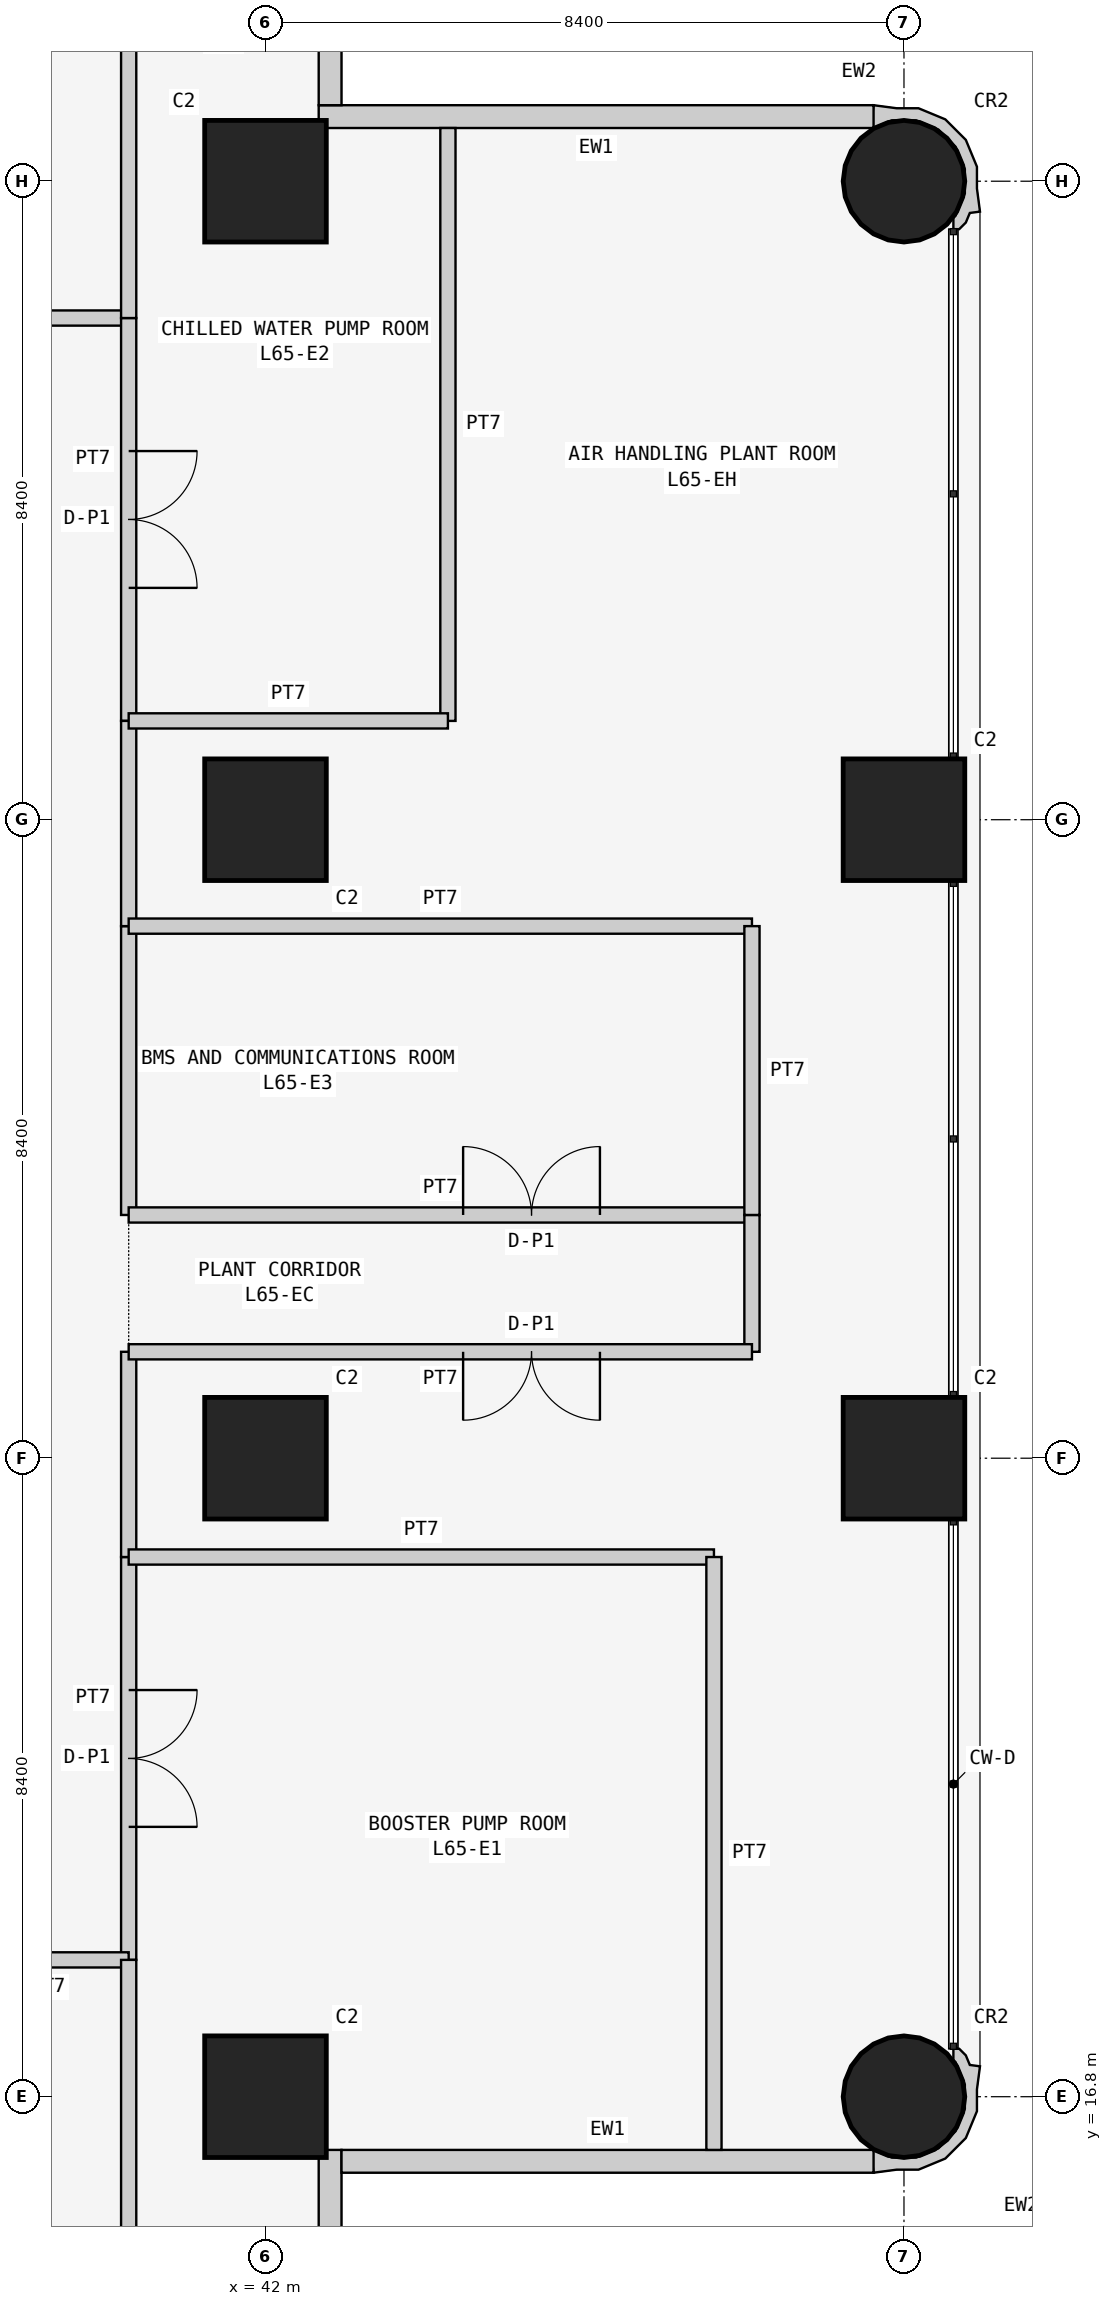
"""IFC4 building model, lengths in metres.
Left out: names, types, materials, properties, quantities, classifications, styles, units other than length and angle.
Written with IfcOpenShell. Run it as: python <this file> out.ifc"""

import sys

from ifc_helpers import new_model, si_unit, direction, frame, frame_2d, origin, origin_2d, place, context, subcontext, project, spatial, polyline, rectangle, circle, outline, extrude, element, fill, save


model = new_model("IFC4")
c1 = context("Model", 3, precision=1e-05, world=origin(), true_north=direction((0.0, 1.0)))
c2 = subcontext(c1, "Body", "Model", "MODEL_VIEW")
j1 = project(units=[si_unit("LENGTHUNIT", "METRE"), si_unit("PLANEANGLEUNIT", "RADIAN")], contexts=[c1])
p1 = place(None, origin())
s1 = spatial("IfcSite", under=j1, at=p1, CompositionType="ELEMENT")
p2 = place(p1, origin())
s2 = spatial("IfcBuilding", under=s1, at=p2, CompositionType="ELEMENT")
p3 = place(p2, frame((0.0, 0.0, 248.1)))
s3 = spatial("IfcBuildingStorey", under=s2, at=p3, CompositionType="ELEMENT", Elevation=248.1)
for number, where, z_axis, x_axis in (
    (1, (42.0, 16.8, 0.0), (0.0, 0.0, 1.0), (1.0, 0.0, 0.0)),
    (2, (42.0, 25.2, 0.0), (0.0, 0.0, 1.0), (1.0, 0.0, 0.0)),
    (3, (42.0, 33.6, 0.0), (0.0, 0.0, 1.0), (1.0, 0.0, 0.0)),
    (4, (42.0, 42.0, 0.0), (0.0, 0.0, 1.0), (1.0, 0.0, 0.0)),
):
    element("IfcColumn", number, at=place(p3, frame(where, z_axis=z_axis, x_axis=x_axis)), inside=s3, PredefinedType="COLUMN", context=c2, shape_type="SweptSolid", body=[
        extrude(rectangle(XDim=1.6, YDim=1.6, at=origin_2d()), origin(), (0.0, 0.0, 1.0), 6.0),
    ])
p4 = place(p3, frame((50.4, 16.8, 0.0), z_axis=(0.0, 0.0, 1.0), x_axis=(1.0, 0.0, 0.0)))
e5 = element("IfcColumn", 5, at=p4, inside=s3, PredefinedType="COLUMN", context=c2, shape_type="SweptSolid", body=[
    extrude(circle(Radius=0.8, at=origin_2d()), origin(), (0.0, 0.0, 1.0), 6.0),
])
for number, where, z_axis, x_axis in (
    (6, (50.4, 25.2, 0.0), (0.0, 0.0, 1.0), (1.0, 0.0, 0.0)),
    (7, (50.4, 33.6, 0.0), (0.0, 0.0, 1.0), (1.0, 0.0, 0.0)),
):
    element("IfcColumn", number, at=place(p3, frame(where, z_axis=z_axis, x_axis=x_axis)), inside=s3, PredefinedType="COLUMN", context=c2, shape_type="SweptSolid", body=[
        extrude(rectangle(XDim=1.6, YDim=1.6, at=origin_2d()), origin(), (0.0, 0.0, 1.0), 6.0),
    ])
p5 = place(p3, frame((50.4, 42.0, 0.0), z_axis=(0.0, 0.0, 1.0), x_axis=(1.0, 0.0, 0.0)))
e8 = element("IfcColumn", 8, at=p5, inside=s3, PredefinedType="COLUMN", context=c2, shape_type="SweptSolid", body=[
    extrude(circle(Radius=0.8, at=origin_2d()), origin(), (0.0, 0.0, 1.0), 6.0),
])
p6 = place(p3, frame((42.85, 8.8, 0.0), z_axis=(0.0, 0.0, 1.0), x_axis=(0.0, 1.0, 0.0)))
e9 = element("IfcWall", 9, at=p6, inside=s3, PredefinedType="SOLIDWALL", context=c2, shape_type="SweptSolid", body=[
    extrude(rectangle(XDim=7.3, YDim=0.3, at=frame_2d((3.65, 0.0))), origin(), (0.0, 0.0, 1.0), 5.85),
])
p7 = place(p3, frame((43.0, 15.95, 0.0), z_axis=(0.0, 0.0, 1.0), x_axis=(1.0, 0.0, 0.0)))
e10 = element("IfcWall", 10, at=p7, inside=s3, PredefinedType="SOLIDWALL", context=c2, shape_type="SweptSolid", body=[
    extrude(rectangle(XDim=7.0, YDim=0.3, at=frame_2d((3.5, 0.0))), origin(), (0.0, 0.0, 1.0), 5.85),
])
p8 = place(p3, frame((50.0, 42.85, 0.0), z_axis=(0.0, 0.0, 1.0), x_axis=(-1.0, 0.0, 0.0)))
e11 = element("IfcWall", 11, at=p8, inside=s3, PredefinedType="SOLIDWALL", context=c2, shape_type="SweptSolid", body=[
    extrude(rectangle(XDim=7.3, YDim=0.3, at=frame_2d((3.65, 0.0))), origin(), (0.0, 0.0, 1.0), 5.85),
])
p9 = place(p3, frame((42.85, 43.0, 0.0), z_axis=(0.0, 0.0, 1.0), x_axis=(0.0, 1.0, 0.0)))
e12 = element("IfcWall", 12, at=p9, inside=s3, PredefinedType="SOLIDWALL", context=c2, shape_type="SweptSolid", body=[
    extrude(rectangle(XDim=7.0, YDim=0.3, at=frame_2d((3.5, 0.0))), origin(), (0.0, 0.0, 1.0), 5.85),
])
p10 = place(p3, frame((50.073, 15.983, 0.0), z_axis=(0.0, 0.0, 1.0), x_axis=(0.936905536785, -0.34958262992, 0.0)))
e13 = element("IfcWall", 13, at=p10, inside=s3, PredefinedType="SOLIDWALL", context=c2, shape_type="SweptSolid", body=[
    extrude(outline(polyline([(0.818, 1.604), (0.686, 1.574), (0.593, 1.674), (0.481, 1.725), (0.409, 1.698), (0.461, 1.559), (0.498, 1.542), (0.715, 1.309), (0.827, 1.01), (0.815, 0.692), (0.683, 0.402), (0.45, 0.185), (0.151, 0.074), (-0.117, 0.083), (-0.128, 0.077), (-0.147, 0.07), (-0.005, -0.197), (0.266, -0.053), (0.535, 0.047), (0.815, 0.307), (0.973, 0.655), (0.987, 1.036), (0.886, 1.306), (0.818, 1.604)])), origin(), (0.0, 0.0, 1.0), 5.85),
])
p11 = place(p3, frame((51.065, 41.423, 0.0), z_axis=(0.0, 0.0, 1.0), x_axis=(0.936905536785, 0.34958262992, 0.0)))
e14 = element("IfcWall", 14, at=p11, inside=s3, PredefinedType="SOLIDWALL", context=c2, shape_type="SweptSolid", body=[
    extrude(outline(polyline([(0.445, 0.347), (0.545, 0.616), (0.532, 0.998), (0.373, 1.345), (0.094, 1.605), (-0.176, 1.706), (-0.446, 1.849), (-0.588, 1.582), (-0.57, 1.575), (-0.558, 1.569), (-0.29, 1.579), (0.008, 1.468), (0.242, 1.25), (0.374, 0.96), (0.385, 0.642), (0.274, 0.344), (0.057, 0.11), (0.019, 0.093), (-0.033, -0.046), (0.039, -0.072), (0.151, -0.021), (0.245, 0.079), (0.376, 0.049), (0.445, 0.347)])), origin(), (0.0, 0.0, 1.0), 5.85),
])
p12 = place(p3, frame((34.9, 40.2, 0.0), z_axis=(0.0, 0.0, 1.0), x_axis=(1.0, 0.0, 0.0)))
e15 = element("IfcWall", 15, at=p12, inside=s3, PredefinedType="PARTITIONING", context=c2, shape_type="SweptSolid", body=[
    extrude(rectangle(XDim=5.3, YDim=0.2, at=frame_2d((2.65, 0.0))), origin(), (0.0, 0.0, 1.0), 5.85),
])
p13 = place(p12, frame((1.75, 0.0, 0.0)))
e16 = element("IfcOpeningElement", 16, at=p13, cuts=e15, PredefinedType="OPENING", context=c2, shape_type="SweptSolid", body=[
    extrude(rectangle(XDim=1.8, YDim=2.4, at=frame_2d((0.9, 1.2))), frame((0.0, 0.11, 0.0), z_axis=(0.0, -1.0, 0.0), x_axis=(1.0, 0.0, 0.0)), (0.0, 0.0, 1.0), 0.22),
])
p14 = place(p3, frame((40.2, 23.9, 0.0), z_axis=(0.0, 0.0, 1.0), x_axis=(0.0, -1.0, 0.0)))
e17 = element("IfcWall", 17, at=p14, inside=s3, PredefinedType="PARTITIONING", context=c2, shape_type="SweptSolid", body=[
    extrude(rectangle(XDim=5.3, YDim=0.2, at=frame_2d((2.65, 0.0))), origin(), (0.0, 0.0, 1.0), 5.85),
])
p15 = place(p14, frame((1.75, 0.0, 0.0)))
e18 = element("IfcOpeningElement", 18, at=p15, cuts=e17, PredefinedType="OPENING", context=c2, shape_type="SweptSolid", body=[
    extrude(rectangle(XDim=1.8, YDim=2.4, at=frame_2d((0.9, 1.2))), frame((0.0, 0.11, 0.0), z_axis=(0.0, -1.0, 0.0), x_axis=(1.0, 0.0, 0.0)), (0.0, 0.0, 1.0), 0.22),
])
p16 = place(p3, frame((40.2, 40.2, 0.0), z_axis=(0.0, 0.0, 1.0), x_axis=(0.0, -1.0, 0.0)))
e19 = element("IfcWall", 19, at=p16, inside=s3, PredefinedType="PARTITIONING", context=c2, shape_type="SweptSolid", body=[
    extrude(rectangle(XDim=5.3, YDim=0.2, at=frame_2d((2.65, 0.0))), origin(), (0.0, 0.0, 1.0), 5.85),
])
p17 = place(p16, frame((1.75, 0.0, 0.0)))
e20 = element("IfcOpeningElement", 20, at=p17, cuts=e19, PredefinedType="OPENING", context=c2, shape_type="SweptSolid", body=[
    extrude(rectangle(XDim=1.8, YDim=2.4, at=frame_2d((0.9, 1.2))), frame((0.0, 0.11, 0.0), z_axis=(0.0, -1.0, 0.0), x_axis=(1.0, 0.0, 0.0)), (0.0, 0.0, 1.0), 0.22),
])
p18 = place(p3, frame((40.2, 32.2, 0.0), z_axis=(0.0, 0.0, 1.0), x_axis=(0.0, -1.0, 0.0)))
e21 = element("IfcWall", 21, at=p18, inside=s3, PredefinedType="PARTITIONING", context=c2, shape_type="SweptSolid", body=[
    extrude(rectangle(XDim=3.8, YDim=0.2, at=frame_2d((1.9, 0.0))), origin(), (0.0, 0.0, 1.0), 5.85),
])
p19 = place(p3, frame((40.2, 26.6, 0.0), z_axis=(0.0, 0.0, 1.0), x_axis=(0.0, -1.0, 0.0)))
e22 = element("IfcWall", 22, at=p19, inside=s3, PredefinedType="PARTITIONING", context=c2, shape_type="SweptSolid", body=[
    extrude(rectangle(XDim=2.7, YDim=0.2, at=frame_2d((1.35, 0.0))), origin(), (0.0, 0.0, 1.0), 5.85),
])
p20 = place(p3, frame((40.2, 34.9, 0.0), z_axis=(0.0, 0.0, 1.0), x_axis=(0.0, -1.0, 0.0)))
e23 = element("IfcWall", 23, at=p20, inside=s3, PredefinedType="PARTITIONING", context=c2, shape_type="SweptSolid", body=[
    extrude(rectangle(XDim=2.7, YDim=0.2, at=frame_2d((1.35, 0.0))), origin(), (0.0, 0.0, 1.0), 5.85),
])
p21 = place(p3, frame((40.2, 18.6, 0.0), z_axis=(0.0, 0.0, 1.0), x_axis=(-1.0, 0.0, 0.0)))
e24 = element("IfcWall", 24, at=p21, inside=s3, PredefinedType="PARTITIONING", context=c2, shape_type="SweptSolid", body=[
    extrude(rectangle(XDim=5.3, YDim=0.2, at=frame_2d((2.65, 0.0))), origin(), (0.0, 0.0, 1.0), 5.85),
])
p22 = place(p21, frame((1.75, 0.0, 0.0)))
e25 = element("IfcOpeningElement", 25, at=p22, cuts=e24, PredefinedType="OPENING", context=c2, shape_type="SweptSolid", body=[
    extrude(rectangle(XDim=1.8, YDim=2.4, at=frame_2d((0.9, 1.2))), frame((0.0, 0.11, 0.0), z_axis=(0.0, -1.0, 0.0), x_axis=(1.0, 0.0, 0.0)), (0.0, 0.0, 1.0), 0.22),
])
p23 = place(p3, frame((40.2, 44.2, 0.0), z_axis=(0.0, 0.0, 1.0), x_axis=(0.0, -1.0, 0.0)))
e26 = element("IfcWall", 26, at=p23, inside=s3, PredefinedType="PARTITIONING", context=c2, shape_type="SweptSolid", body=[
    extrude(rectangle(XDim=4.0, YDim=0.2, at=frame_2d((2.0, 0.0))), origin(), (0.0, 0.0, 1.0), 5.85),
])
p24 = place(p3, frame((40.2, 23.9, 0.0), z_axis=(0.0, 0.0, 1.0), x_axis=(1.0, 0.0, 0.0)))
e27 = element("IfcWall", 27, at=p24, inside=s3, PredefinedType="PARTITIONING", context=c2, shape_type="SweptSolid", body=[
    extrude(rectangle(XDim=7.7, YDim=0.2, at=frame_2d((3.85, 0.0))), origin(), (0.0, 0.0, 1.0), 5.85),
])
p25 = place(p3, frame((47.9, 23.9, 0.0), z_axis=(0.0, 0.0, 1.0), x_axis=(0.0, -1.0, 0.0)))
e28 = element("IfcWall", 28, at=p25, inside=s3, PredefinedType="PARTITIONING", context=c2, shape_type="SweptSolid", body=[
    extrude(rectangle(XDim=7.8, YDim=0.2, at=frame_2d((3.9, 0.0))), origin(), (0.0, 0.0, 1.0), 5.85),
])
p26 = place(p3, frame((40.2, 14.6, 0.0), z_axis=(0.0, 0.0, 1.0), x_axis=(0.0, 1.0, 0.0)))
e29 = element("IfcWall", 29, at=p26, inside=s3, PredefinedType="PARTITIONING", context=c2, shape_type="SweptSolid", body=[
    extrude(rectangle(XDim=4.0, YDim=0.2, at=frame_2d((2.0, 0.0))), origin(), (0.0, 0.0, 1.0), 5.85),
])
p27 = place(p3, frame((44.4, 42.7, 0.0), z_axis=(0.0, 0.0, 1.0), x_axis=(0.0, -1.0, 0.0)))
e30 = element("IfcWall", 30, at=p27, inside=s3, PredefinedType="PARTITIONING", context=c2, shape_type="SweptSolid", body=[
    extrude(rectangle(XDim=7.8, YDim=0.2, at=frame_2d((3.9, 0.0))), origin(), (0.0, 0.0, 1.0), 5.85),
])
p28 = place(p3, frame((44.4, 34.9, 0.0), z_axis=(0.0, 0.0, 1.0), x_axis=(-1.0, 0.0, 0.0)))
e31 = element("IfcWall", 31, at=p28, inside=s3, PredefinedType="PARTITIONING", context=c2, shape_type="SweptSolid", body=[
    extrude(rectangle(XDim=4.2, YDim=0.2, at=frame_2d((2.1, 0.0))), origin(), (0.0, 0.0, 1.0), 5.85),
])
p29 = place(p3, frame((40.2, 28.4, 0.0), z_axis=(0.0, 0.0, 1.0), x_axis=(1.0, 0.0, 0.0)))
e32 = element("IfcWall", 32, at=p29, inside=s3, PredefinedType="PARTITIONING", context=c2, shape_type="SweptSolid", body=[
    extrude(rectangle(XDim=8.2, YDim=0.2, at=frame_2d((4.1, 0.0))), origin(), (0.0, 0.0, 1.0), 5.85),
])
p30 = place(p29, frame((4.4, 0.0, 0.0)))
e33 = element("IfcOpeningElement", 33, at=p30, cuts=e32, PredefinedType="OPENING", context=c2, shape_type="SweptSolid", body=[
    extrude(rectangle(XDim=1.8, YDim=2.4, at=frame_2d((0.9, 1.2))), frame((0.0, 0.11, 0.0), z_axis=(0.0, -1.0, 0.0), x_axis=(1.0, 0.0, 0.0)), (0.0, 0.0, 1.0), 0.22),
])
p31 = place(p3, frame((48.4, 28.4, 0.0), z_axis=(0.0, 0.0, 1.0), x_axis=(0.0, -1.0, 0.0)))
e34 = element("IfcWall", 34, at=p31, inside=s3, PredefinedType="PARTITIONING", context=c2, shape_type="SweptSolid", body=[
    extrude(rectangle(XDim=1.8, YDim=0.2, at=frame_2d((0.9, 0.0))), origin(), (0.0, 0.0, 1.0), 5.85),
])
p32 = place(p3, frame((48.4, 26.6, 0.0), z_axis=(0.0, 0.0, 1.0), x_axis=(-1.0, 0.0, 0.0)))
e35 = element("IfcWall", 35, at=p32, inside=s3, PredefinedType="PARTITIONING", context=c2, shape_type="SweptSolid", body=[
    extrude(rectangle(XDim=8.2, YDim=0.2, at=frame_2d((4.1, 0.0))), origin(), (0.0, 0.0, 1.0), 5.85),
])
p33 = place(p32, frame((2.0, 0.0, 0.0)))
e36 = element("IfcOpeningElement", 36, at=p33, cuts=e35, PredefinedType="OPENING", context=c2, shape_type="SweptSolid", body=[
    extrude(rectangle(XDim=1.8, YDim=2.4, at=frame_2d((0.9, 1.2))), frame((0.0, 0.11, 0.0), z_axis=(0.0, -1.0, 0.0), x_axis=(1.0, 0.0, 0.0)), (0.0, 0.0, 1.0), 0.22),
])
p34 = place(p3, frame((40.2, 32.2, 0.0), z_axis=(0.0, 0.0, 1.0), x_axis=(1.0, 0.0, 0.0)))
e37 = element("IfcWall", 37, at=p34, inside=s3, PredefinedType="PARTITIONING", context=c2, shape_type="SweptSolid", body=[
    extrude(rectangle(XDim=8.2, YDim=0.2, at=frame_2d((4.1, 0.0))), origin(), (0.0, 0.0, 1.0), 5.85),
])
p35 = place(p3, frame((48.4, 32.2, 0.0), z_axis=(0.0, 0.0, 1.0), x_axis=(0.0, -1.0, 0.0)))
e38 = element("IfcWall", 38, at=p35, inside=s3, PredefinedType="PARTITIONING", context=c2, shape_type="SweptSolid", body=[
    extrude(rectangle(XDim=3.8, YDim=0.2, at=frame_2d((1.9, 0.0))), origin(), (0.0, 0.0, 1.0), 5.85),
])
p36 = place(p15, origin())
e39 = element("IfcDoor", 39, at=p36, inside=s3, OperationType="DOUBLE_DOOR_SINGLE_SWING", PredefinedType="DOOR", context=c2, shape_type="SweptSolid", body=[
    extrude(rectangle(XDim=1.8, YDim=2.4, at=frame_2d((0.9, 1.2))), frame((0.0, 0.025, 0.0), z_axis=(0.0, -1.0, 0.0), x_axis=(1.0, 0.0, 0.0)), (0.0, 0.0, 1.0), 0.05),
])
fill(e18, e39)
p37 = place(p17, origin())
e40 = element("IfcDoor", 40, at=p37, inside=s3, OperationType="DOUBLE_DOOR_SINGLE_SWING", PredefinedType="DOOR", context=c2, shape_type="SweptSolid", body=[
    extrude(rectangle(XDim=1.8, YDim=2.4, at=frame_2d((0.9, 1.2))), frame((0.0, 0.025, 0.0), z_axis=(0.0, -1.0, 0.0), x_axis=(1.0, 0.0, 0.0)), (0.0, 0.0, 1.0), 0.05),
])
fill(e20, e40)
p38 = place(p30, origin())
e41 = element("IfcDoor", 41, at=p38, inside=s3, OperationType="DOUBLE_DOOR_SINGLE_SWING", PredefinedType="DOOR", context=c2, shape_type="SweptSolid", body=[
    extrude(rectangle(XDim=1.8, YDim=2.4, at=frame_2d((0.9, 1.2))), frame((0.0, 0.025, 0.0), z_axis=(0.0, -1.0, 0.0), x_axis=(1.0, 0.0, 0.0)), (0.0, 0.0, 1.0), 0.05),
])
fill(e33, e41)
p39 = place(p33, origin())
e42 = element("IfcDoor", 42, at=p39, inside=s3, OperationType="DOUBLE_DOOR_SINGLE_SWING", PredefinedType="DOOR", context=c2, shape_type="SweptSolid", body=[
    extrude(rectangle(XDim=1.8, YDim=2.4, at=frame_2d((0.9, 1.2))), frame((0.0, 0.025, 0.0), z_axis=(0.0, -1.0, 0.0), x_axis=(1.0, 0.0, 0.0)), (0.0, 0.0, 1.0), 0.05),
])
fill(e36, e42)
save(model, sys.argv[1])
